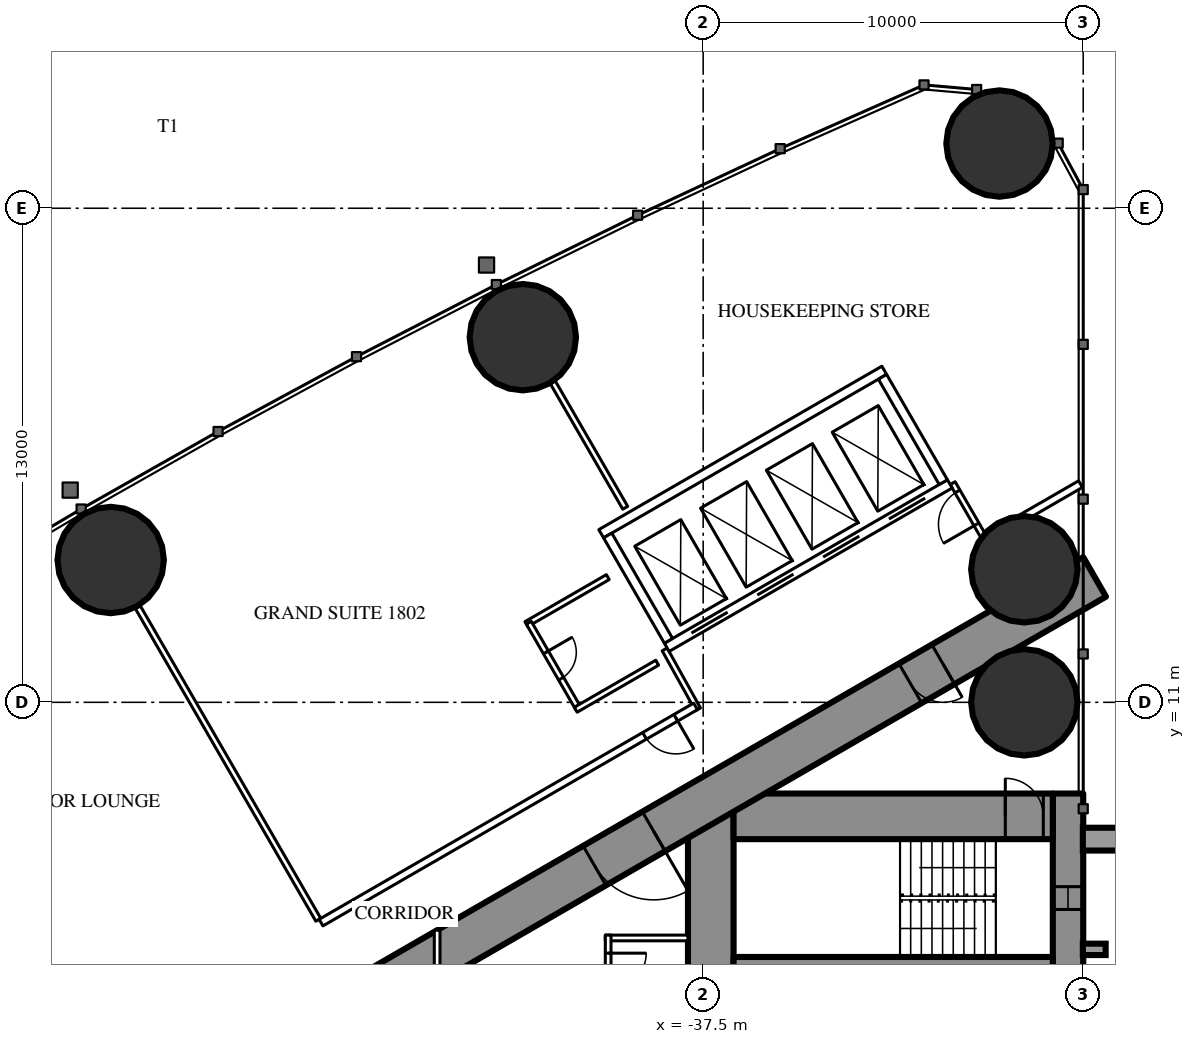
"""IFC4 building model, lengths in metres.
Left out: names, types, materials, properties, quantities, classifications, styles, units other than length and angle.
Written with IfcOpenShell. Run it as: python <this file> out.ifc"""

import sys

from ifc_helpers import new_model, si_unit, direction, frame, frame_2d, origin, origin_2d, place, context, subcontext, project, spatial, rectangle, hollow_circle, extrude, element, fill, save


model = new_model("IFC4")
c1 = context("Model", 3, precision=1e-05, world=origin(), true_north=direction((0.0, 1.0)))
c2 = subcontext(c1, "Body", "Model", "MODEL_VIEW")
j1 = project(units=[si_unit("LENGTHUNIT", "METRE"), si_unit("PLANEANGLEUNIT", "RADIAN")], contexts=[c1])
p1 = place(None, origin())
s1 = spatial("IfcSite", under=j1, at=p1, CompositionType="ELEMENT")
p2 = place(p1, origin())
s2 = spatial("IfcBuilding", under=s1, at=p2, CompositionType="ELEMENT")
p3 = place(p2, frame((0.0, 0.0, 70.5)))
s3 = spatial("IfcBuildingStorey", under=s2, at=p3, CompositionType="ELEMENT", Elevation=70.5)
for number, where, z_axis, x_axis in (
    (1, (-29.703, 25.703, 0.0), (0.0, 0.0, 1.0), (1.0, 0.0, 0.0)),
    (2, (-29.05, 11.0, 0.0), (0.0, 0.0, 1.0), (1.0, 0.0, 0.0)),
    (3, (-29.05, 14.5, 0.0), (0.0, 0.0, 1.0), (1.0, 0.0, 0.0)),
    (4, (-42.245, 20.607, 0.0), (0.0, 0.0, 1.0), (1.0, 0.0, 0.0)),
    (5, (-53.09, 14.745, 0.0), (0.0, 0.0, 1.0), (1.0, 0.0, 0.0)),
):
    element("IfcColumn", number, at=place(p3, frame(where, z_axis=z_axis, x_axis=x_axis)), inside=s3, PredefinedType="COLUMN", context=c2, shape_type="SweptSolid", body=[
        extrude(hollow_circle(Radius=1.4, WallThickness=0.12, at=origin_2d()), origin(), (0.0, 0.0, 1.0), 3.5),
    ])
p4 = place(p3, frame((-27.9, 8.6, 0.0), z_axis=(0.0, 0.0, 1.0), x_axis=(0.0, -1.0, 0.0)))
e6 = element("IfcWall", 6, at=p4, inside=s3, PredefinedType="SHEAR", context=c2, shape_type="SweptSolid", body=[
    extrude(rectangle(XDim=17.2, YDim=0.8, at=frame_2d((8.6, 0.0))), origin(), (0.0, 0.0, 1.0), 3.5),
])
p5 = place(p4, frame((2.45, 0.0, 0.6)))
e7 = element("IfcOpeningElement", 7, at=p5, cuts=e6, PredefinedType="OPENING", context=c2, shape_type="SweptSolid", body=[
    extrude(rectangle(XDim=0.6, YDim=2.1, at=frame_2d((0.3, 1.05))), frame((0.0, 0.41, 0.0), z_axis=(0.0, -1.0, 0.0), x_axis=(1.0, 0.0, 0.0)), (0.0, 0.0, 1.0), 0.82),
])
p6 = place(p4, frame((14.15, 0.0, 0.6)))
e8 = element("IfcOpeningElement", 8, at=p6, cuts=e6, PredefinedType="OPENING", context=c2, shape_type="SweptSolid", body=[
    extrude(rectangle(XDim=0.6, YDim=2.1, at=frame_2d((0.3, 1.05))), frame((0.0, 0.41, 0.0), z_axis=(0.0, -1.0, 0.0), x_axis=(1.0, 0.0, 0.0)), (0.0, 0.0, 1.0), 0.82),
])
p7 = place(p3, frame((-37.3, 8.6, 0.0), z_axis=(0.0, 0.0, 1.0), x_axis=(0.0, -1.0, 0.0)))
e9 = element("IfcWall", 9, at=p7, inside=s3, PredefinedType="SHEAR", context=c2, shape_type="SweptSolid", body=[
    extrude(rectangle(XDim=17.2, YDim=1.2, at=frame_2d((8.6, 0.0))), origin(), (0.0, 0.0, 1.0), 3.5),
])
p8 = place(p7, frame((7.7, 0.0, 0.0)))
e10 = element("IfcOpeningElement", 10, at=p8, cuts=e9, PredefinedType="OPENING", context=c2, shape_type="SweptSolid", body=[
    extrude(rectangle(XDim=1.8, YDim=2.2, at=frame_2d((0.9, 1.1))), frame((0.0, 0.61, 0.0), z_axis=(0.0, -1.0, 0.0), x_axis=(1.0, 0.0, 0.0)), (0.0, 0.0, 1.0), 1.22),
])
p9 = place(p3, frame((-28.3, 8.0, 0.0), z_axis=(0.0, 0.0, 1.0), x_axis=(-1.0, 0.0, 0.0)))
e11 = element("IfcWall", 11, at=p9, inside=s3, PredefinedType="SHEAR", context=c2, shape_type="SweptSolid", body=[
    extrude(rectangle(XDim=8.4, YDim=1.2, at=frame_2d((4.2, 0.0))), origin(), (0.0, 0.0, 1.0), 3.5),
])
p10 = place(p9, frame((0.25, 0.0, 0.0)))
e12 = element("IfcOpeningElement", 12, at=p10, cuts=e11, PredefinedType="OPENING", context=c2, shape_type="SweptSolid", body=[
    extrude(rectangle(XDim=1.0, YDim=2.2, at=frame_2d((0.5, 1.1))), frame((0.0, 0.61, 0.0), z_axis=(0.0, -1.0, 0.0), x_axis=(1.0, 0.0, 0.0)), (0.0, 0.0, 1.0), 1.22),
])
p11 = place(p3, frame((-28.3, 4.15, 0.0), z_axis=(0.0, 0.0, 1.0), x_axis=(-1.0, 0.0, 0.0)))
e13 = element("IfcWall", 13, at=p11, inside=s3, PredefinedType="SHEAR", context=c2, shape_type="SweptSolid", body=[
    extrude(rectangle(XDim=8.4, YDim=0.3, at=frame_2d((4.2, 0.0))), origin(), (0.0, 0.0, 1.0), 3.5),
])
p12 = place(p3, frame((-27.2, 14.3, 0.0), z_axis=(0.0, 0.0, 1.0), x_axis=(-0.866026593062, -0.499997940104, 0.0)))
e14 = element("IfcWall", 14, at=p12, inside=s3, PredefinedType="SHEAR", context=c2, shape_type="SweptSolid", body=[
    extrude(rectangle(XDim=28.946, YDim=1.2, at=frame_2d((14.473, 0.0))), origin(), (0.0, 0.0, 1.0), 3.5),
])
p13 = place(p12, frame((4.6, 0.0, 0.0)))
e15 = element("IfcOpeningElement", 15, at=p13, cuts=e14, PredefinedType="OPENING", context=c2, shape_type="SweptSolid", body=[
    extrude(rectangle(XDim=1.0, YDim=2.2, at=frame_2d((0.5, 1.1))), frame((0.0, 0.61, 0.0), z_axis=(0.0, -1.0, 0.0), x_axis=(1.0, 0.0, 0.0)), (0.0, 0.0, 1.0), 1.22),
])
p14 = place(p12, frame((13.395, 0.0, 0.0)))
e16 = element("IfcOpeningElement", 16, at=p14, cuts=e14, PredefinedType="OPENING", context=c2, shape_type="SweptSolid", body=[
    extrude(rectangle(XDim=1.8, YDim=2.2, at=frame_2d((0.9, 1.1))), frame((0.0, 0.61, 0.0), z_axis=(0.0, -1.0, 0.0), x_axis=(1.0, 0.0, 0.0)), (0.0, 0.0, 1.0), 1.22),
])
p15 = place(p3, frame((-47.627, 5.278, 0.0), z_axis=(0.0, 0.0, 1.0), x_axis=(-0.500009844318, 0.86601972009, 0.0)))
e17 = element("IfcWall", 17, at=p15, inside=s3, PredefinedType="PARTITIONING", context=c2, shape_type="SweptSolid", body=[
    extrude(rectangle(XDim=9.51, YDim=0.15, at=frame_2d((4.755, 0.0))), origin(), (0.0, 0.0, 1.0), 2.25),
])
p16 = place(p3, frame((-39.551, 16.119, 0.0), z_axis=(0.0, 0.0, 1.0), x_axis=(-0.500014214979, 0.866017196607, 0.0)))
e18 = element("IfcWall", 18, at=p16, inside=s3, PredefinedType="PARTITIONING", context=c2, shape_type="SweptSolid", body=[
    extrude(rectangle(XDim=3.815, YDim=0.15, at=frame_2d((1.907, 0.0))), origin(), (0.0, 0.0, 1.0), 3.25),
])
p17 = place(p3, frame((-27.572, 16.741, 0.0), z_axis=(0.0, 0.0, 1.0), x_axis=(-0.866034618596, -0.499984039138, 0.0)))
e19 = element("IfcWall", 19, at=p17, inside=s3, PredefinedType="PARTITIONING", context=c2, shape_type="SweptSolid", body=[
    extrude(rectangle(XDim=2.854, YDim=0.2, at=frame_2d((1.427, 0.0))), origin(), (0.0, 0.0, 1.0), 3.25),
])
p18 = place(p3, frame((-38.513, 12.392, 0.0), z_axis=(0.0, 0.0, 1.0), x_axis=(0.485585508183, -0.874189175317, 0.0)))
e20 = element("IfcWall", 20, at=p18, inside=s3, PredefinedType="PARTITIONING", context=c2, shape_type="SweptSolid", body=[
    extrude(rectangle(XDim=1.805, YDim=0.15, at=frame_2d((0.902, 0.0))), origin(), (0.0, 0.0, 1.0), 3.25),
])
p19 = place(p3, frame((-30.033, 15.205, 0.0), z_axis=(0.0, 0.0, 1.0), x_axis=(-0.499980071345, 0.866036909293, 0.0)))
e21 = element("IfcWall", 21, at=p19, inside=s3, PredefinedType="PARTITIONING", context=c2, shape_type="SweptSolid", body=[
    extrude(rectangle(XDim=1.805, YDim=0.15, at=frame_2d((0.902, 0.0))), origin(), (0.0, 0.0, 1.0), 3.25),
])
p20 = place(p19, frame((0.552, 0.0, 0.0)))
e22 = element("IfcOpeningElement", 22, at=p20, cuts=e21, PredefinedType="OPENING", context=c2, shape_type="SweptSolid", body=[
    extrude(rectangle(XDim=1.0, YDim=2.2, at=frame_2d((0.5, 1.1))), frame((0.0, 0.085, 0.0), z_axis=(0.0, -1.0, 0.0), x_axis=(1.0, 0.0, 0.0)), (0.0, 0.0, 1.0), 0.17),
])
p21 = place(p3, frame((-37.7, 10.894, 0.0), z_axis=(0.0, 0.0, 1.0), x_axis=(-0.866024459167, -0.500001636122, 0.0)))
e23 = element("IfcWall", 23, at=p21, inside=s3, PredefinedType="PARTITIONING", context=c2, shape_type="SweptSolid", body=[
    extrude(rectangle(XDim=11.38, YDim=0.2, at=frame_2d((5.69, 0.0))), origin(), (0.0, 0.0, 1.0), 3.25),
])
p22 = place(p21, frame((0.6, 0.0, 0.0)))
e24 = element("IfcOpeningElement", 24, at=p22, cuts=e23, PredefinedType="OPENING", context=c2, shape_type="SweptSolid", body=[
    extrude(rectangle(XDim=0.95, YDim=2.2, at=frame_2d((0.475, 1.1))), frame((0.0, 0.11, 0.0), z_axis=(0.0, -1.0, 0.0), x_axis=(1.0, 0.0, 0.0)), (0.0, 0.0, 1.0), 0.22),
])
p23 = place(p3, frame((-40.01, 14.294, 0.0), z_axis=(0.0, 0.0, 1.0), x_axis=(-0.866031185235, -0.4999899861, 0.0)))
e25 = element("IfcWall", 25, at=p23, inside=s3, PredefinedType="PARTITIONING", context=c2, shape_type="SweptSolid", body=[
    extrude(rectangle(XDim=2.475, YDim=0.15, at=frame_2d((1.238, 0.0))), origin(), (0.0, 0.0, 1.0), 3.25),
])
p24 = place(p3, frame((-40.788, 10.843, 0.0), z_axis=(0.0, 0.0, 1.0), x_axis=(-0.500006934395, 0.866021400173, 0.0)))
e26 = element("IfcWall", 26, at=p24, inside=s3, PredefinedType="PARTITIONING", context=c2, shape_type="SweptSolid", body=[
    extrude(rectangle(XDim=2.6, YDim=0.15, at=frame_2d((1.3, 0.0))), origin(), (0.0, 0.0, 1.0), 3.25),
])
p25 = place(p24, frame((0.9, 0.0, 0.0)))
e27 = element("IfcOpeningElement", 27, at=p25, cuts=e26, PredefinedType="OPENING", context=c2, shape_type="SweptSolid", body=[
    extrude(rectangle(XDim=0.8, YDim=2.2, at=frame_2d((0.4, 1.1))), frame((0.0, 0.085, 0.0), z_axis=(0.0, -1.0, 0.0), x_axis=(1.0, 0.0, 0.0)), (0.0, 0.0, 1.0), 0.17),
])
p26 = place(p3, frame((-38.71, 12.042, 0.0), z_axis=(0.0, 0.0, 1.0), x_axis=(-0.86604923931, -0.499958713387, 0.0)))
e28 = element("IfcWall", 28, at=p26, inside=s3, PredefinedType="PARTITIONING", context=c2, shape_type="SweptSolid", body=[
    extrude(rectangle(XDim=2.475, YDim=0.15, at=frame_2d((1.237, 0.0))), origin(), (0.0, 0.0, 1.0), 3.25),
])
p27 = place(p3, frame((-37.9, 4.8, 0.0), z_axis=(0.0, 0.0, 1.0), x_axis=(-1.0, 0.0, 0.0)))
e29 = element("IfcWall", 29, at=p27, inside=s3, PredefinedType="PARTITIONING", context=c2, shape_type="SweptSolid", body=[
    extrude(rectangle(XDim=2.175, YDim=0.15, at=frame_2d((1.087, 0.0))), origin(), (0.0, 0.0, 1.0), 3.25),
])
p28 = place(p3, frame((-40.0, 4.875, 0.0), z_axis=(0.0, 0.0, 1.0), x_axis=(0.0, -1.0, 0.0)))
e30 = element("IfcWall", 30, at=p28, inside=s3, PredefinedType="PARTITIONING", context=c2, shape_type="SweptSolid", body=[
    extrude(rectangle(XDim=1.95, YDim=0.15, at=frame_2d((0.975, 0.0))), origin(), (0.0, 0.0, 1.0), 3.25),
])
p29 = place(p28, frame((0.475, 0.0, 0.0)))
e31 = element("IfcOpeningElement", 31, at=p29, cuts=e30, PredefinedType="OPENING", context=c2, shape_type="SweptSolid", body=[
    extrude(rectangle(XDim=1.0, YDim=2.2, at=frame_2d((0.5, 1.1))), frame((0.0, 0.085, 0.0), z_axis=(0.0, -1.0, 0.0), x_axis=(1.0, 0.0, 0.0)), (0.0, 0.0, 1.0), 0.17),
])
p30 = place(p3, frame((-44.5, 5.005, 0.0), z_axis=(0.0, 0.0, 1.0), x_axis=(0.0, -1.0, 0.0)))
e32 = element("IfcWall", 32, at=p30, inside=s3, PredefinedType="PARTITIONING", context=c2, shape_type="SweptSolid", body=[
    extrude(rectangle(XDim=10.009, YDim=0.15, at=frame_2d((5.005, 0.0))), origin(), (0.0, 0.0, 1.0), 2.45),
])
p31 = place(p30, frame((2.002, 0.0, 0.0)))
e33 = element("IfcOpeningElement", 33, at=p31, cuts=e32, PredefinedType="OPENING", context=c2, shape_type="SweptSolid", body=[
    extrude(rectangle(XDim=1.0, YDim=2.2, at=frame_2d((0.5, 1.1))), frame((0.0, 0.085, 0.0), z_axis=(0.0, -1.0, 0.0), x_axis=(1.0, 0.0, 0.0)), (0.0, 0.0, 1.0), 0.17),
])
p32 = place(p30, frame((7.007, 0.0, 0.0)))
e34 = element("IfcOpeningElement", 34, at=p32, cuts=e32, PredefinedType="OPENING", context=c2, shape_type="SweptSolid", body=[
    extrude(rectangle(XDim=1.0, YDim=2.2, at=frame_2d((0.5, 1.1))), frame((0.0, 0.085, 0.0), z_axis=(0.0, -1.0, 0.0), x_axis=(1.0, 0.0, 0.0)), (0.0, 0.0, 1.0), 0.17),
])
p33 = place(p3, frame((-31.01, 16.747, 0.0), z_axis=(0.0, 0.0, 1.0), x_axis=(-0.866028165386, -0.499995216735, 0.0)))
e35 = element("IfcWall", 35, at=p33, inside=s3, PredefinedType="PARTITIONING", context=c2, shape_type="SweptSolid", body=[
    extrude(rectangle(XDim=8.6, YDim=0.25, at=frame_2d((4.3, 0.0))), origin(), (0.0, 0.0, 1.0), 3.25),
])
p34 = place(p33, frame((0.75, 0.0, 0.0)))
e36 = element("IfcOpeningElement", 36, at=p34, cuts=e35, PredefinedType="OPENING", context=c2, shape_type="SweptSolid", body=[
    extrude(rectangle(XDim=1.1, YDim=2.2, at=frame_2d((0.55, 1.1))), frame((0.0, 0.135, 0.0), z_axis=(0.0, -1.0, 0.0), x_axis=(1.0, 0.0, 0.0)), (0.0, 0.0, 1.0), 0.27),
])
p35 = place(p33, frame((2.75, 0.0, 0.0)))
e37 = element("IfcOpeningElement", 37, at=p35, cuts=e35, PredefinedType="OPENING", context=c2, shape_type="SweptSolid", body=[
    extrude(rectangle(XDim=1.1, YDim=2.2, at=frame_2d((0.55, 1.1))), frame((0.0, 0.135, 0.0), z_axis=(0.0, -1.0, 0.0), x_axis=(1.0, 0.0, 0.0)), (0.0, 0.0, 1.0), 0.27),
])
p36 = place(p33, frame((4.75, 0.0, 0.0)))
e38 = element("IfcOpeningElement", 38, at=p36, cuts=e35, PredefinedType="OPENING", context=c2, shape_type="SweptSolid", body=[
    extrude(rectangle(XDim=1.1, YDim=2.2, at=frame_2d((0.55, 1.1))), frame((0.0, 0.135, 0.0), z_axis=(0.0, -1.0, 0.0), x_axis=(1.0, 0.0, 0.0)), (0.0, 0.0, 1.0), 0.27),
])
p37 = place(p33, frame((6.75, 0.0, 0.0)))
e39 = element("IfcOpeningElement", 39, at=p37, cuts=e35, PredefinedType="OPENING", context=c2, shape_type="SweptSolid", body=[
    extrude(rectangle(XDim=1.1, YDim=2.2, at=frame_2d((0.55, 1.1))), frame((0.0, 0.135, 0.0), z_axis=(0.0, -1.0, 0.0), x_axis=(1.0, 0.0, 0.0)), (0.0, 0.0, 1.0), 0.27),
])
p38 = place(p3, frame((-32.736, 19.736, 0.0), z_axis=(0.0, 0.0, 1.0), x_axis=(-0.866028165386, -0.499995216735, 0.0)))
e40 = element("IfcWall", 40, at=p38, inside=s3, PredefinedType="PARTITIONING", context=c2, shape_type="SweptSolid", body=[
    extrude(rectangle(XDim=8.6, YDim=0.25, at=frame_2d((4.3, 0.0))), origin(), (0.0, 0.0, 1.0), 3.25),
])
p39 = place(p3, frame((-31.181, 16.793, 0.0), z_axis=(0.0, 0.0, 1.0), x_axis=(-0.499929347863, 0.866066190972, 0.0)))
e41 = element("IfcWall", 41, at=p39, inside=s3, PredefinedType="PARTITIONING", context=c2, shape_type="SweptSolid", body=[
    extrude(rectangle(XDim=3.201, YDim=0.25, at=frame_2d((1.6, 0.0))), origin(), (0.0, 0.0, 1.0), 3.25),
])
p40 = place(p3, frame((-38.413, 12.618, 0.0), z_axis=(0.0, 0.0, 1.0), x_axis=(-0.499872130319, 0.866099216793, 0.0)))
e42 = element("IfcWall", 42, at=p40, inside=s3, PredefinedType="PARTITIONING", context=c2, shape_type="SweptSolid", body=[
    extrude(rectangle(XDim=3.2, YDim=0.25, at=frame_2d((1.6, 0.0))), origin(), (0.0, 0.0, 1.0), 3.25),
])
p41 = place(p25, origin())
e43 = element("IfcDoor", 43, at=p41, inside=s3, OperationType="SINGLE_SWING_RIGHT", PredefinedType="DOOR", context=c2, shape_type="SweptSolid", body=[
    extrude(rectangle(XDim=0.8, YDim=2.2, at=frame_2d((0.4, 1.1))), frame((0.0, 0.025, 0.0), z_axis=(0.0, -1.0, 0.0), x_axis=(1.0, 0.0, 0.0)), (0.0, 0.0, 1.0), 0.05),
])
fill(e27, e43)
p42 = place(p22, origin())
e44 = element("IfcDoor", 44, at=p42, inside=s3, OperationType="SINGLE_SWING_LEFT", PredefinedType="DOOR", context=c2, shape_type="SweptSolid", body=[
    extrude(rectangle(XDim=0.95, YDim=2.2, at=frame_2d((0.475, 1.1))), frame((0.0, 0.025, 0.0), z_axis=(0.0, -1.0, 0.0), x_axis=(1.0, 0.0, 0.0)), (0.0, 0.0, 1.0), 0.05),
])
fill(e24, e44)
p43 = place(p20, origin())
e45 = element("IfcDoor", 45, at=p43, inside=s3, OperationType="SINGLE_SWING_LEFT", PredefinedType="DOOR", context=c2, shape_type="SweptSolid", body=[
    extrude(rectangle(XDim=1.0, YDim=2.2, at=frame_2d((0.5, 1.1))), frame((0.0, 0.025, 0.0), z_axis=(0.0, -1.0, 0.0), x_axis=(1.0, 0.0, 0.0)), (0.0, 0.0, 1.0), 0.05),
])
fill(e22, e45)
p44 = place(p29, origin())
e46 = element("IfcDoor", 46, at=p44, inside=s3, OperationType="SINGLE_SWING_LEFT", PredefinedType="DOOR", context=c2, shape_type="SweptSolid", body=[
    extrude(rectangle(XDim=1.0, YDim=2.2, at=frame_2d((0.5, 1.1))), frame((0.0, 0.025, 0.0), z_axis=(0.0, -1.0, 0.0), x_axis=(1.0, 0.0, 0.0)), (0.0, 0.0, 1.0), 0.05),
])
fill(e31, e46)
p45 = place(p13, origin())
e47 = element("IfcDoor", 47, at=p45, inside=s3, OperationType="SINGLE_SWING_LEFT", PredefinedType="DOOR", context=c2, shape_type="SweptSolid", body=[
    extrude(rectangle(XDim=1.0, YDim=2.2, at=frame_2d((0.5, 1.1))), frame((0.0, 0.025, 0.0), z_axis=(0.0, -1.0, 0.0), x_axis=(1.0, 0.0, 0.0)), (0.0, 0.0, 1.0), 0.05),
])
fill(e15, e47)
p46 = place(p14, origin())
e48 = element("IfcDoor", 48, at=p46, inside=s3, OperationType="DOUBLE_DOOR_SINGLE_SWING", PredefinedType="DOOR", context=c2, shape_type="SweptSolid", body=[
    extrude(rectangle(XDim=1.8, YDim=2.2, at=frame_2d((0.9, 1.1))), frame((0.0, 0.025, 0.0), z_axis=(0.0, -1.0, 0.0), x_axis=(1.0, 0.0, 0.0)), (0.0, 0.0, 1.0), 0.05),
])
fill(e16, e48)
p47 = place(p10, origin())
e49 = element("IfcDoor", 49, at=p47, inside=s3, OperationType="SINGLE_SWING_RIGHT", PredefinedType="DOOR", context=c2, shape_type="SweptSolid", body=[
    extrude(rectangle(XDim=1.0, YDim=2.2, at=frame_2d((0.5, 1.1))), frame((0.0, 0.025, 0.0), z_axis=(0.0, -1.0, 0.0), x_axis=(1.0, 0.0, 0.0)), (0.0, 0.0, 1.0), 0.05),
])
fill(e12, e49)
p48 = place(p34, origin())
e50 = element("IfcDoor", 50, at=p48, inside=s3, OperationType="DOUBLE_DOOR_SLIDING", PredefinedType="USERDEFINED", context=c2, shape_type="SweptSolid", body=[
    extrude(rectangle(XDim=1.1, YDim=2.2, at=frame_2d((0.55, 1.1))), frame((0.0, 0.025, 0.0), z_axis=(0.0, -1.0, 0.0), x_axis=(1.0, 0.0, 0.0)), (0.0, 0.0, 1.0), 0.05),
])
fill(e36, e50)
p49 = place(p35, origin())
e51 = element("IfcDoor", 51, at=p49, inside=s3, OperationType="DOUBLE_DOOR_SLIDING", PredefinedType="USERDEFINED", context=c2, shape_type="SweptSolid", body=[
    extrude(rectangle(XDim=1.1, YDim=2.2, at=frame_2d((0.55, 1.1))), frame((0.0, 0.025, 0.0), z_axis=(0.0, -1.0, 0.0), x_axis=(1.0, 0.0, 0.0)), (0.0, 0.0, 1.0), 0.05),
])
fill(e37, e51)
p50 = place(p36, origin())
e52 = element("IfcDoor", 52, at=p50, inside=s3, OperationType="DOUBLE_DOOR_SLIDING", PredefinedType="USERDEFINED", context=c2, shape_type="SweptSolid", body=[
    extrude(rectangle(XDim=1.1, YDim=2.2, at=frame_2d((0.55, 1.1))), frame((0.0, 0.025, 0.0), z_axis=(0.0, -1.0, 0.0), x_axis=(1.0, 0.0, 0.0)), (0.0, 0.0, 1.0), 0.05),
])
fill(e38, e52)
p51 = place(p37, origin())
e53 = element("IfcDoor", 53, at=p51, inside=s3, OperationType="DOUBLE_DOOR_SLIDING", PredefinedType="USERDEFINED", context=c2, shape_type="SweptSolid", body=[
    extrude(rectangle(XDim=1.1, YDim=2.2, at=frame_2d((0.55, 1.1))), frame((0.0, 0.025, 0.0), z_axis=(0.0, -1.0, 0.0), x_axis=(1.0, 0.0, 0.0)), (0.0, 0.0, 1.0), 0.05),
])
fill(e39, e53)
p52 = place(p5, origin())
e54 = element("IfcWindow", 54, at=p52, inside=s3, PartitioningType="SINGLE_PANEL", PredefinedType="WINDOW", context=c2, shape_type="SweptSolid", body=[
    extrude(rectangle(XDim=0.6, YDim=2.1, at=frame_2d((0.3, 1.05))), frame((0.0, 0.03, 0.0), z_axis=(0.0, -1.0, 0.0), x_axis=(1.0, 0.0, 0.0)), (0.0, 0.0, 1.0), 0.06),
])
fill(e7, e54)
save(model, sys.argv[1])
